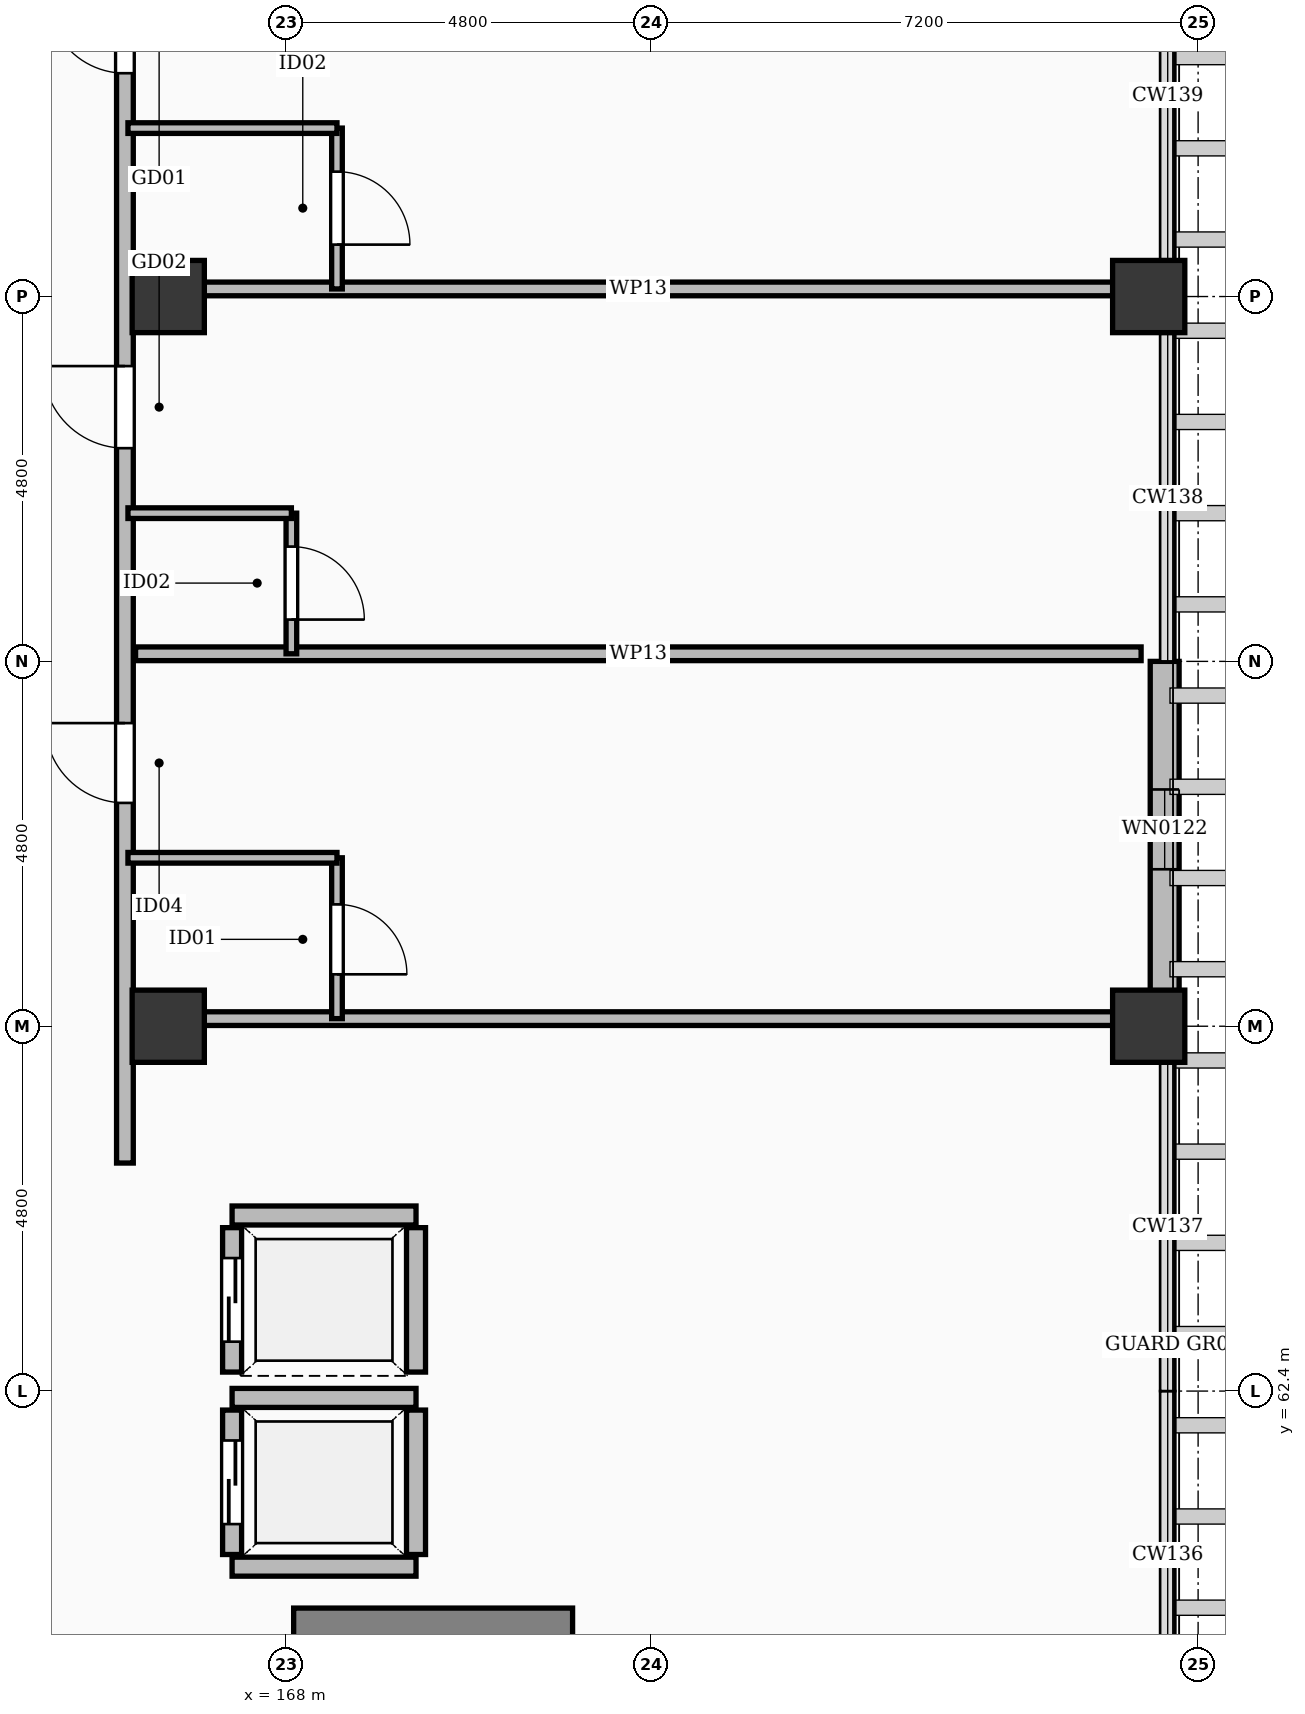
"""IFC4 building model, lengths in metres.
Left out: names, types, materials, properties, quantities, classifications, styles, units other than length and angle.
Written with IfcOpenShell. Run it as: python <this file> out.ifc"""

import sys

from ifc_helpers import new_model, si_unit, direction, frame, frame_2d, origin, origin_2d, place, context, subcontext, project, spatial, rectangle, extrude, element, fill, save


model = new_model("IFC4")
c1 = context("Model", 3, precision=1e-05, world=origin(), true_north=direction((0.0, 1.0)))
c2 = subcontext(c1, "Body", "Model", "MODEL_VIEW")
j1 = project(units=[si_unit("LENGTHUNIT", "METRE"), si_unit("PLANEANGLEUNIT", "RADIAN")], contexts=[c1])
p1 = place(None, origin())
s1 = spatial("IfcSite", under=j1, at=p1, CompositionType="ELEMENT")
p2 = place(p1, origin())
s2 = spatial("IfcBuilding", under=s1, at=p2, CompositionType="ELEMENT")
p3 = place(p2, frame((0.0, 0.0, 11.4)))
s3 = spatial("IfcBuildingStorey", under=s2, at=p3, CompositionType="ELEMENT", Elevation=11.4)
for number, where, z_axis, x_axis in (
    (1, (166.45, 67.2, 0.0), (0.0, 0.0, 1.0), (1.0, 0.0, 0.0)),
    (2, (166.45, 76.8, 0.0), (0.0, 0.0, 1.0), (1.0, 0.0, 0.0)),
    (3, (179.35, 67.2, 0.0), (0.0, 0.0, 1.0), (1.0, 0.0, 0.0)),
    (4, (179.35, 76.8, 0.0), (0.0, 0.0, 1.0), (1.0, 0.0, 0.0)),
):
    element("IfcColumn", number, at=place(p3, frame(where, z_axis=z_axis, x_axis=x_axis)), inside=s3, PredefinedType="COLUMN", context=c2, shape_type="SweptSolid", body=[
        extrude(rectangle(XDim=0.95, YDim=0.95, at=origin_2d()), origin(), (0.0, 0.0, 1.0), 4.8),
    ])
p4 = place(p3, frame((179.56, 72.0, 0.0), z_axis=(0.0, 0.0, 1.0), x_axis=(0.0, -1.0, 0.0)))
e5 = element("IfcWall", 5, at=p4, inside=s3, PredefinedType="SOLIDWALL", context=c2, shape_type="SweptSolid", body=[
    extrude(rectangle(XDim=4.35, YDim=0.38, at=frame_2d((2.175, 0.0))), origin(), (0.0, 0.0, 1.0), 3.662),
])
p5 = place(p4, frame((1.685, 0.0, 0.55)))
e6 = element("IfcOpeningElement", 6, at=p5, cuts=e5, PredefinedType="OPENING", context=c2, shape_type="SweptSolid", body=[
    extrude(rectangle(XDim=1.05, YDim=1.65, at=frame_2d((0.525, 0.825))), frame((0.0, 0.202, 0.0), z_axis=(0.0, -1.0, 0.0), x_axis=(1.0, 0.0, 0.0)), (0.0, 0.0, 1.0), 0.404),
])
p6 = place(p3, frame((168.1, 59.32, 0.0), z_axis=(0.0, 0.0, 1.0), x_axis=(1.0, 0.0, 0.0)))
e7 = element("IfcWall", 7, at=p6, inside=s3, PredefinedType="SHEAR", context=c2, shape_type="SweptSolid", body=[
    extrude(rectangle(XDim=3.67, YDim=0.45, at=frame_2d((1.835, 0.0))), origin(), (0.0, 0.0, 1.0), 4.42),
])
for number, where, z_axis, x_axis in (
    (8, (167.29, 60.09, 0.0), (0.0, 0.0, 1.0), (1.0, 0.0, 0.0)),
    (9, (167.29, 62.31, 0.0), (0.0, 0.0, 1.0), (1.0, 0.0, 0.0)),
):
    element("IfcWall", number, at=place(p3, frame(where, z_axis=z_axis, x_axis=x_axis)), inside=s3, PredefinedType="SOLIDWALL", context=c2, shape_type="SweptSolid", body=[
        extrude(rectangle(XDim=2.42, YDim=0.25, at=frame_2d((1.21, 0.0))), origin(), (0.0, 0.0, 1.0), 4.42),
    ])
p7 = place(p3, frame((167.29, 60.25, 0.0), z_axis=(0.0, 0.0, 1.0), x_axis=(0.0, 1.0, 0.0)))
e10 = element("IfcWall", 10, at=p7, inside=s3, PredefinedType="SOLIDWALL", context=c2, shape_type="SweptSolid", body=[
    extrude(rectangle(XDim=1.9, YDim=0.25, at=frame_2d((0.95, 0.0))), origin(), (0.0, 0.0, 1.0), 4.42),
])
p8 = place(p7, frame((0.4, 0.0, 0.0)))
e11 = element("IfcOpeningElement", 11, at=p8, cuts=e10, PredefinedType="OPENING", context=c2, shape_type="SweptSolid", body=[
    extrude(rectangle(XDim=1.1, YDim=2.2, at=frame_2d((0.55, 1.1))), frame((0.0, 0.137, 0.0), z_axis=(0.0, -1.0, 0.0), x_axis=(1.0, 0.0, 0.0)), (0.0, 0.0, 1.0), 0.274),
])
p9 = place(p3, frame((169.71, 60.25, 0.0), z_axis=(0.0, 0.0, 1.0), x_axis=(0.0, 1.0, 0.0)))
e12 = element("IfcWall", 12, at=p9, inside=s3, PredefinedType="SOLIDWALL", context=c2, shape_type="SweptSolid", body=[
    extrude(rectangle(XDim=1.9, YDim=0.25, at=frame_2d((0.95, 0.0))), origin(), (0.0, 0.0, 1.0), 4.42),
])
p10 = place(p3, frame((167.29, 64.71, 0.0), z_axis=(0.0, 0.0, 1.0), x_axis=(1.0, 0.0, 0.0)))
e13 = element("IfcWall", 13, at=p10, inside=s3, PredefinedType="SOLIDWALL", context=c2, shape_type="SweptSolid", body=[
    extrude(rectangle(XDim=2.42, YDim=0.25, at=frame_2d((1.21, 0.0))), origin(), (0.0, 0.0, 1.0), 4.42),
])
p11 = place(p3, frame((167.29, 62.65, 0.0), z_axis=(0.0, 0.0, 1.0), x_axis=(0.0, 1.0, 0.0)))
e14 = element("IfcWall", 14, at=p11, inside=s3, PredefinedType="SOLIDWALL", context=c2, shape_type="SweptSolid", body=[
    extrude(rectangle(XDim=1.9, YDim=0.25, at=frame_2d((0.95, 0.0))), origin(), (0.0, 0.0, 1.0), 4.42),
])
p12 = place(p11, frame((0.4, 0.0, 0.0)))
e15 = element("IfcOpeningElement", 15, at=p12, cuts=e14, PredefinedType="OPENING", context=c2, shape_type="SweptSolid", body=[
    extrude(rectangle(XDim=1.1, YDim=2.2, at=frame_2d((0.55, 1.1))), frame((0.0, 0.137, 0.0), z_axis=(0.0, -1.0, 0.0), x_axis=(1.0, 0.0, 0.0)), (0.0, 0.0, 1.0), 0.274),
])
p13 = place(p3, frame((169.71, 62.65, 0.0), z_axis=(0.0, 0.0, 1.0), x_axis=(0.0, 1.0, 0.0)))
e16 = element("IfcWall", 16, at=p13, inside=s3, PredefinedType="SOLIDWALL", context=c2, shape_type="SweptSolid", body=[
    extrude(rectangle(XDim=1.9, YDim=0.25, at=frame_2d((0.95, 0.0))), origin(), (0.0, 0.0, 1.0), 4.42),
])
p14 = place(p3, frame((165.88, 65.4, 0.0), z_axis=(0.0, 0.0, 1.0), x_axis=(0.0, 1.0, 0.0)))
e17 = element("IfcWall", 17, at=p14, inside=s3, PredefinedType="PARTITIONING", context=c2, shape_type="SweptSolid", body=[
    extrude(rectangle(XDim=60.25, YDim=0.22, at=frame_2d((30.125, 0.0))), origin(), (0.0, 0.0, 1.0), 3.662),
])
p15 = place(p14, frame((4.738, 0.0, 0.0)))
e18 = element("IfcOpeningElement", 18, at=p15, cuts=e17, PredefinedType="OPENING", context=c2, shape_type="SweptSolid", body=[
    extrude(rectangle(XDim=1.05, YDim=2.18, at=frame_2d((0.525, 1.09))), frame((0.0, 0.122, 0.0), z_axis=(0.0, -1.0, 0.0), x_axis=(1.0, 0.0, 0.0)), (0.0, 0.0, 1.0), 0.244),
])
p16 = place(p14, frame((9.405, 0.0, 0.0)))
e19 = element("IfcOpeningElement", 19, at=p16, cuts=e17, PredefinedType="OPENING", context=c2, shape_type="SweptSolid", body=[
    extrude(rectangle(XDim=1.08, YDim=2.25, at=frame_2d((0.54, 1.125))), frame((0.0, 0.122, 0.0), z_axis=(0.0, -1.0, 0.0), x_axis=(1.0, 0.0, 0.0)), (0.0, 0.0, 1.0), 0.244),
])
p17 = place(p14, frame((14.338, 0.0, 0.0)))
e20 = element("IfcOpeningElement", 20, at=p17, cuts=e17, PredefinedType="OPENING", context=c2, shape_type="SweptSolid", body=[
    extrude(rectangle(XDim=1.02, YDim=2.2, at=frame_2d((0.51, 1.1))), frame((0.0, 0.122, 0.0), z_axis=(0.0, -1.0, 0.0), x_axis=(1.0, 0.0, 0.0)), (0.0, 0.0, 1.0), 0.244),
])
p18 = place(p14, frame((18.655, 0.0, 0.0)))
e21 = element("IfcOpeningElement", 21, at=p18, cuts=e17, PredefinedType="OPENING", context=c2, shape_type="SweptSolid", body=[
    extrude(rectangle(XDim=1.5, YDim=2.3, at=frame_2d((0.75, 1.15))), frame((0.0, 0.122, 0.0), z_axis=(0.0, -1.0, 0.0), x_axis=(1.0, 0.0, 0.0)), (0.0, 0.0, 1.0), 0.244),
])
p19 = place(p14, frame((23.938, 0.0, 0.0)))
e22 = element("IfcOpeningElement", 22, at=p19, cuts=e17, PredefinedType="OPENING", context=c2, shape_type="SweptSolid", body=[
    extrude(rectangle(XDim=1.12, YDim=2.15, at=frame_2d((0.56, 1.075))), frame((0.0, 0.122, 0.0), z_axis=(0.0, -1.0, 0.0), x_axis=(1.0, 0.0, 0.0)), (0.0, 0.0, 1.0), 0.244),
])
p20 = place(p14, frame((28.605, 0.0, 0.0)))
e23 = element("IfcOpeningElement", 23, at=p20, cuts=e17, PredefinedType="OPENING", context=c2, shape_type="SweptSolid", body=[
    extrude(rectangle(XDim=1.28, YDim=2.16, at=frame_2d((0.64, 1.08))), frame((0.0, 0.122, 0.0), z_axis=(0.0, -1.0, 0.0), x_axis=(1.0, 0.0, 0.0)), (0.0, 0.0, 1.0), 0.244),
])
p21 = place(p14, frame((33.538, 0.0, 0.0)))
e24 = element("IfcOpeningElement", 24, at=p21, cuts=e17, PredefinedType="OPENING", context=c2, shape_type="SweptSolid", body=[
    extrude(rectangle(XDim=1.05, YDim=2.18, at=frame_2d((0.525, 1.09))), frame((0.0, 0.122, 0.0), z_axis=(0.0, -1.0, 0.0), x_axis=(1.0, 0.0, 0.0)), (0.0, 0.0, 1.0), 0.244),
])
p22 = place(p14, frame((38.205, 0.0, 0.0)))
e25 = element("IfcOpeningElement", 25, at=p22, cuts=e17, PredefinedType="OPENING", context=c2, shape_type="SweptSolid", body=[
    extrude(rectangle(XDim=1.08, YDim=2.25, at=frame_2d((0.54, 1.125))), frame((0.0, 0.122, 0.0), z_axis=(0.0, -1.0, 0.0), x_axis=(1.0, 0.0, 0.0)), (0.0, 0.0, 1.0), 0.244),
])
p23 = place(p14, frame((43.138, 0.0, 0.0)))
e26 = element("IfcOpeningElement", 26, at=p23, cuts=e17, PredefinedType="OPENING", context=c2, shape_type="SweptSolid", body=[
    extrude(rectangle(XDim=1.02, YDim=2.2, at=frame_2d((0.51, 1.1))), frame((0.0, 0.122, 0.0), z_axis=(0.0, -1.0, 0.0), x_axis=(1.0, 0.0, 0.0)), (0.0, 0.0, 1.0), 0.244),
])
p24 = place(p14, frame((47.455, 0.0, 0.0)))
e27 = element("IfcOpeningElement", 27, at=p24, cuts=e17, PredefinedType="OPENING", context=c2, shape_type="SweptSolid", body=[
    extrude(rectangle(XDim=1.5, YDim=2.3, at=frame_2d((0.75, 1.15))), frame((0.0, 0.122, 0.0), z_axis=(0.0, -1.0, 0.0), x_axis=(1.0, 0.0, 0.0)), (0.0, 0.0, 1.0), 0.244),
])
p25 = place(p14, frame((52.738, 0.0, 0.0)))
e28 = element("IfcOpeningElement", 28, at=p25, cuts=e17, PredefinedType="OPENING", context=c2, shape_type="SweptSolid", body=[
    extrude(rectangle(XDim=1.12, YDim=2.15, at=frame_2d((0.56, 1.075))), frame((0.0, 0.122, 0.0), z_axis=(0.0, -1.0, 0.0), x_axis=(1.0, 0.0, 0.0)), (0.0, 0.0, 1.0), 0.244),
])
p26 = place(p14, frame((57.405, 0.0, 0.0)))
e29 = element("IfcOpeningElement", 29, at=p26, cuts=e17, PredefinedType="OPENING", context=c2, shape_type="SweptSolid", body=[
    extrude(rectangle(XDim=1.28, YDim=2.16, at=frame_2d((0.64, 1.08))), frame((0.0, 0.122, 0.0), z_axis=(0.0, -1.0, 0.0), x_axis=(1.0, 0.0, 0.0)), (0.0, 0.0, 1.0), 0.244),
])
p27 = place(p3, frame((166.02, 67.3, 0.0), z_axis=(0.0, 0.0, 1.0), x_axis=(1.0, 0.0, 0.0)))
e30 = element("IfcWall", 30, at=p27, inside=s3, PredefinedType="PARTITIONING", context=c2, shape_type="SweptSolid", body=[
    extrude(rectangle(XDim=13.23, YDim=0.18, at=frame_2d((6.615, 0.0))), origin(), (0.0, 0.0, 1.0), 3.662),
])
p28 = place(p3, frame((168.67, 67.3, 0.0), z_axis=(0.0, 0.0, 1.0), x_axis=(0.0, 1.0, 0.0)))
e31 = element("IfcWall", 31, at=p28, inside=s3, PredefinedType="PARTITIONING", context=c2, shape_type="SweptSolid", body=[
    extrude(rectangle(XDim=2.116, YDim=0.14, at=frame_2d((1.058, 0.0))), origin(), (0.0, 0.0, 1.0), 3.692),
])
p29 = place(p28, frame((0.583, 0.0, 0.0)))
e32 = element("IfcOpeningElement", 32, at=p29, cuts=e31, PredefinedType="OPENING", context=c2, shape_type="SweptSolid", body=[
    extrude(rectangle(XDim=0.92, YDim=2.1, at=frame_2d((0.46, 1.05))), frame((0.0, 0.082, 0.0), z_axis=(0.0, -1.0, 0.0), x_axis=(1.0, 0.0, 0.0)), (0.0, 0.0, 1.0), 0.164),
])
p30 = place(p3, frame((165.92, 69.416, 0.0), z_axis=(0.0, 0.0, 1.0), x_axis=(1.0, 0.0, 0.0)))
e33 = element("IfcWall", 33, at=p30, inside=s3, PredefinedType="PARTITIONING", context=c2, shape_type="SweptSolid", body=[
    extrude(rectangle(XDim=2.75, YDim=0.14, at=frame_2d((1.375, 0.0))), origin(), (0.0, 0.0, 1.0), 3.692),
])
p31 = place(p3, frame((166.02, 72.1, 0.0), z_axis=(0.0, 0.0, 1.0), x_axis=(1.0, 0.0, 0.0)))
e34 = element("IfcWall", 34, at=p31, inside=s3, PredefinedType="PARTITIONING", context=c2, shape_type="SweptSolid", body=[
    extrude(rectangle(XDim=13.23, YDim=0.18, at=frame_2d((6.615, 0.0))), origin(), (0.0, 0.0, 1.0), 3.662),
])
p32 = place(p3, frame((168.07, 72.1, 0.0), z_axis=(0.0, 0.0, 1.0), x_axis=(0.0, 1.0, 0.0)))
e35 = element("IfcWall", 35, at=p32, inside=s3, PredefinedType="PARTITIONING", context=c2, shape_type="SweptSolid", body=[
    extrude(rectangle(XDim=1.85, YDim=0.14, at=frame_2d((0.925, 0.0))), origin(), (0.0, 0.0, 1.0), 4.42),
])
p33 = place(p32, frame((0.45, 0.0, 0.0)))
e36 = element("IfcOpeningElement", 36, at=p33, cuts=e35, PredefinedType="OPENING", context=c2, shape_type="SweptSolid", body=[
    extrude(rectangle(XDim=0.96, YDim=2.12, at=frame_2d((0.48, 1.06))), frame((0.0, 0.082, 0.0), z_axis=(0.0, -1.0, 0.0), x_axis=(1.0, 0.0, 0.0)), (0.0, 0.0, 1.0), 0.164),
])
p34 = place(p3, frame((165.92, 73.95, 0.0), z_axis=(0.0, 0.0, 1.0), x_axis=(1.0, 0.0, 0.0)))
e37 = element("IfcWall", 37, at=p34, inside=s3, PredefinedType="PARTITIONING", context=c2, shape_type="SweptSolid", body=[
    extrude(rectangle(XDim=2.15, YDim=0.14, at=frame_2d((1.075, 0.0))), origin(), (0.0, 0.0, 1.0), 3.692),
])
p35 = place(p3, frame((166.02, 76.9, 0.0), z_axis=(0.0, 0.0, 1.0), x_axis=(1.0, 0.0, 0.0)))
e38 = element("IfcWall", 38, at=p35, inside=s3, PredefinedType="PARTITIONING", context=c2, shape_type="SweptSolid", body=[
    extrude(rectangle(XDim=13.23, YDim=0.18, at=frame_2d((6.615, 0.0))), origin(), (0.0, 0.0, 1.0), 3.662),
])
p36 = place(p3, frame((168.67, 76.9, 0.0), z_axis=(0.0, 0.0, 1.0), x_axis=(0.0, 1.0, 0.0)))
e39 = element("IfcWall", 39, at=p36, inside=s3, PredefinedType="PARTITIONING", context=c2, shape_type="SweptSolid", body=[
    extrude(rectangle(XDim=2.116, YDim=0.14, at=frame_2d((1.058, 0.0))), origin(), (0.0, 0.0, 1.0), 3.692),
])
p37 = place(p36, frame((0.583, 0.0, 0.0)))
e40 = element("IfcOpeningElement", 40, at=p37, cuts=e39, PredefinedType="OPENING", context=c2, shape_type="SweptSolid", body=[
    extrude(rectangle(XDim=0.96, YDim=2.12, at=frame_2d((0.48, 1.06))), frame((0.0, 0.082, 0.0), z_axis=(0.0, -1.0, 0.0), x_axis=(1.0, 0.0, 0.0)), (0.0, 0.0, 1.0), 0.164),
])
p38 = place(p3, frame((165.92, 79.016, 0.0), z_axis=(0.0, 0.0, 1.0), x_axis=(1.0, 0.0, 0.0)))
e41 = element("IfcWall", 41, at=p38, inside=s3, PredefinedType="PARTITIONING", context=c2, shape_type="SweptSolid", body=[
    extrude(rectangle(XDim=2.75, YDim=0.14, at=frame_2d((1.375, 0.0))), origin(), (0.0, 0.0, 1.0), 3.692),
])
p39 = place(p5, origin())
e42 = element("IfcWindow", 42, at=p39, inside=s3, PartitioningType="SINGLE_PANEL", PredefinedType="WINDOW", context=c2, shape_type="SweptSolid", body=[
    extrude(rectangle(XDim=1.05, YDim=1.65, at=frame_2d((0.525, 0.825))), frame((0.0, 0.03, 0.0), z_axis=(0.0, -1.0, 0.0), x_axis=(1.0, 0.0, 0.0)), (0.0, 0.0, 1.0), 0.06),
])
fill(e6, e42)
p40 = place(p8, origin())
e43 = element("IfcDoor", 43, at=p40, inside=s3, OperationType="SLIDING_TO_LEFT", PredefinedType="DOOR", context=c2, shape_type="SweptSolid", body=[
    extrude(rectangle(XDim=1.1, YDim=2.2, at=frame_2d((0.55, 1.1))), frame((0.0, 0.025, 0.0), z_axis=(0.0, -1.0, 0.0), x_axis=(1.0, 0.0, 0.0)), (0.0, 0.0, 1.0), 0.05),
])
fill(e11, e43)
p41 = place(p12, origin())
e44 = element("IfcDoor", 44, at=p41, inside=s3, OperationType="SLIDING_TO_LEFT", PredefinedType="DOOR", context=c2, shape_type="SweptSolid", body=[
    extrude(rectangle(XDim=1.1, YDim=2.2, at=frame_2d((0.55, 1.1))), frame((0.0, 0.025, 0.0), z_axis=(0.0, -1.0, 0.0), x_axis=(1.0, 0.0, 0.0)), (0.0, 0.0, 1.0), 0.05),
])
fill(e15, e44)
p42 = place(p15, origin())
e45 = element("IfcDoor", 45, at=p42, inside=s3, OperationType="SINGLE_SWING_RIGHT", PredefinedType="DOOR", context=c2, shape_type="SweptSolid", body=[
    extrude(rectangle(XDim=1.05, YDim=2.18, at=frame_2d((0.525, 1.09))), frame((0.0, 0.025, 0.0), z_axis=(0.0, -1.0, 0.0), x_axis=(1.0, 0.0, 0.0)), (0.0, 0.0, 1.0), 0.05),
])
fill(e18, e45)
p43 = place(p29, frame((0.92, 0.0, 0.0), z_axis=(0.0, 0.0, 1.0), x_axis=(-1.0, 0.0, 0.0)))
e46 = element("IfcDoor", 46, at=p43, inside=s3, OperationType="SINGLE_SWING_LEFT", PredefinedType="DOOR", context=c2, shape_type="SweptSolid", body=[
    extrude(rectangle(XDim=0.92, YDim=2.1, at=frame_2d((0.46, 1.05))), frame((0.0, 0.025, 0.0), z_axis=(0.0, -1.0, 0.0), x_axis=(1.0, 0.0, 0.0)), (0.0, 0.0, 1.0), 0.05),
])
fill(e32, e46)
p44 = place(p16, origin())
e47 = element("IfcDoor", 47, at=p44, inside=s3, OperationType="SINGLE_SWING_RIGHT", PredefinedType="DOOR", context=c2, shape_type="SweptSolid", body=[
    extrude(rectangle(XDim=1.08, YDim=2.25, at=frame_2d((0.54, 1.125))), frame((0.0, 0.025, 0.0), z_axis=(0.0, -1.0, 0.0), x_axis=(1.0, 0.0, 0.0)), (0.0, 0.0, 1.0), 0.05),
])
fill(e19, e47)
p45 = place(p33, frame((0.96, 0.0, 0.0), z_axis=(0.0, 0.0, 1.0), x_axis=(-1.0, 0.0, 0.0)))
e48 = element("IfcDoor", 48, at=p45, inside=s3, OperationType="SINGLE_SWING_LEFT", PredefinedType="DOOR", context=c2, shape_type="SweptSolid", body=[
    extrude(rectangle(XDim=0.96, YDim=2.12, at=frame_2d((0.48, 1.06))), frame((0.0, 0.025, 0.0), z_axis=(0.0, -1.0, 0.0), x_axis=(1.0, 0.0, 0.0)), (0.0, 0.0, 1.0), 0.05),
])
fill(e36, e48)
p46 = place(p17, origin())
e49 = element("IfcDoor", 49, at=p46, inside=s3, OperationType="SINGLE_SWING_RIGHT", PredefinedType="DOOR", context=c2, shape_type="SweptSolid", body=[
    extrude(rectangle(XDim=1.02, YDim=2.2, at=frame_2d((0.51, 1.1))), frame((0.0, 0.025, 0.0), z_axis=(0.0, -1.0, 0.0), x_axis=(1.0, 0.0, 0.0)), (0.0, 0.0, 1.0), 0.05),
])
fill(e20, e49)
p47 = place(p37, frame((0.96, 0.0, 0.0), z_axis=(0.0, 0.0, 1.0), x_axis=(-1.0, 0.0, 0.0)))
e50 = element("IfcDoor", 50, at=p47, inside=s3, OperationType="SINGLE_SWING_LEFT", PredefinedType="DOOR", context=c2, shape_type="SweptSolid", body=[
    extrude(rectangle(XDim=0.96, YDim=2.12, at=frame_2d((0.48, 1.06))), frame((0.0, 0.025, 0.0), z_axis=(0.0, -1.0, 0.0), x_axis=(1.0, 0.0, 0.0)), (0.0, 0.0, 1.0), 0.05),
])
fill(e40, e50)
save(model, sys.argv[1])
